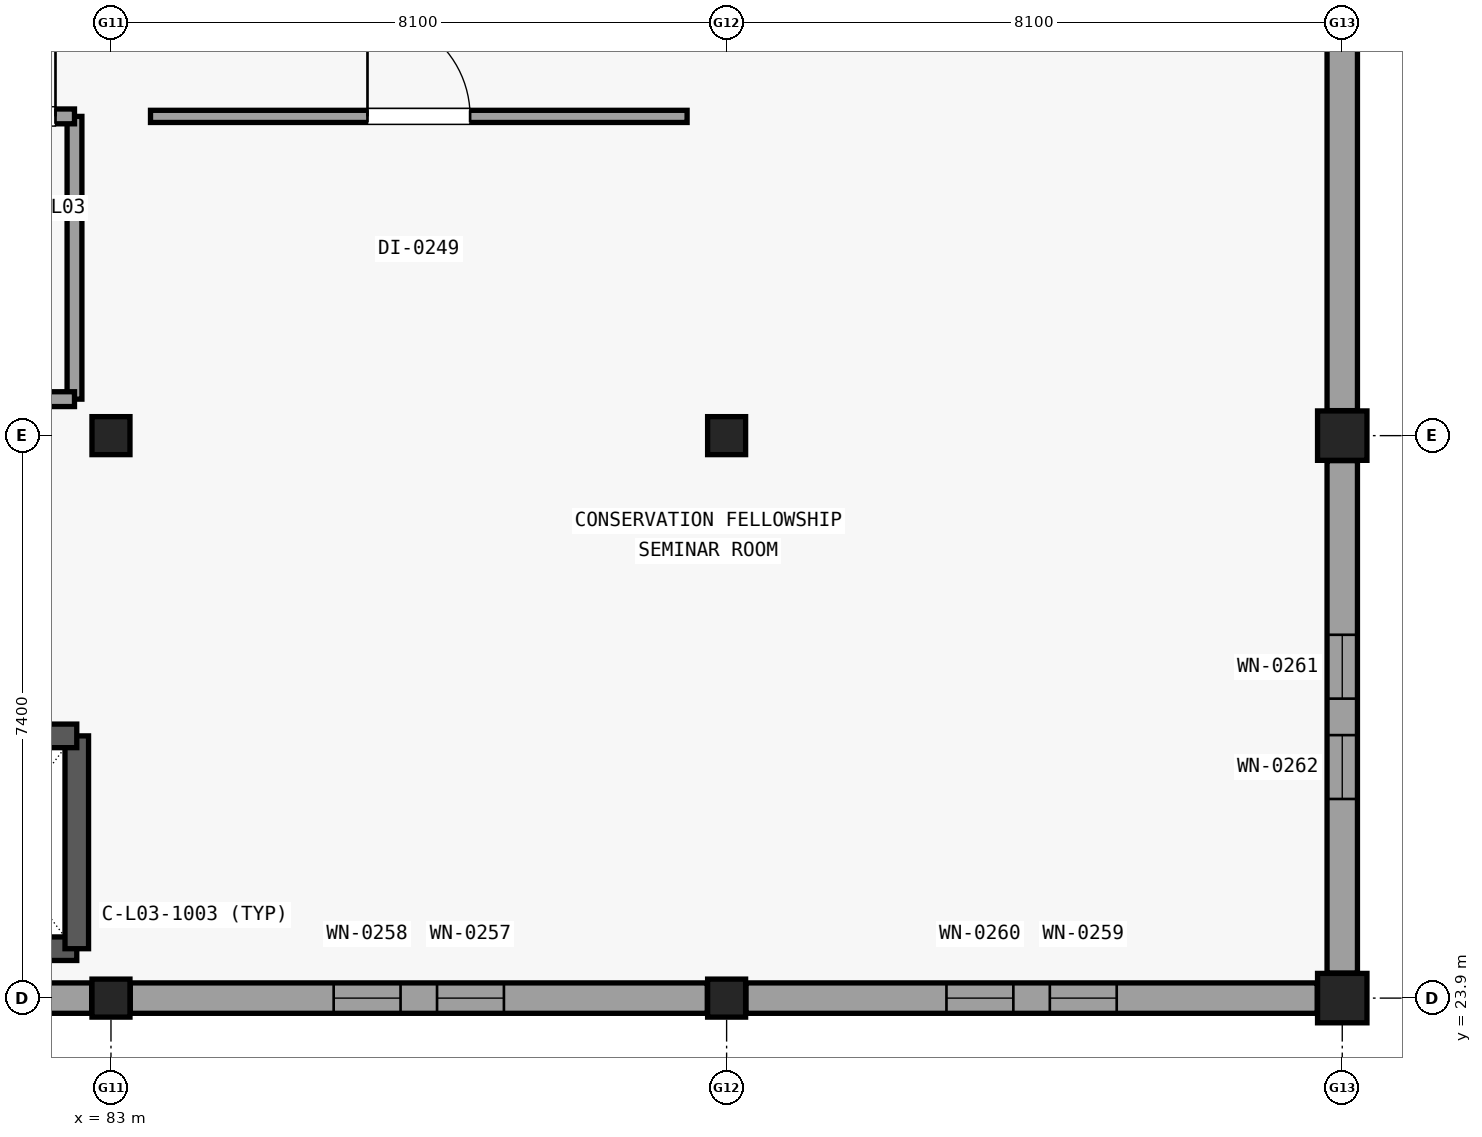
"""IFC4 building model, lengths in metres.
Left out: names, types, materials, properties, quantities, classifications, styles, units other than length and angle.
Written with IfcOpenShell. Run it as: python <this file> out.ifc"""

import sys

from ifc_helpers import new_model, si_unit, direction, frame, frame_2d, origin, origin_2d, place, context, subcontext, project, spatial, rectangle, extrude, element, fill, save


model = new_model("IFC4")
c1 = context("Model", 3, precision=1e-05, world=origin(), true_north=direction((0.0, 1.0)))
c2 = subcontext(c1, "Body", "Model", "MODEL_VIEW")
j1 = project(units=[si_unit("LENGTHUNIT", "METRE"), si_unit("PLANEANGLEUNIT", "RADIAN")], contexts=[c1])
p1 = place(None, origin())
s1 = spatial("IfcSite", under=j1, at=p1, CompositionType="ELEMENT")
p2 = place(p1, origin())
s2 = spatial("IfcBuilding", under=s1, at=p2, CompositionType="ELEMENT")
p3 = place(p2, frame((0.0, 0.0, 13.8)))
s3 = spatial("IfcBuildingStorey", under=s2, at=p3, CompositionType="ELEMENT", Elevation=13.8)
for number, where, z_axis, x_axis in (
    (1, (83.0, 23.9, 0.0), (0.0, 0.0, 1.0), (1.0, 0.0, 0.0)),
    (2, (83.0, 31.3, 0.0), (0.0, 0.0, 1.0), (1.0, 0.0, 0.0)),
    (3, (91.1, 23.9, 0.0), (0.0, 0.0, 1.0), (1.0, 0.0, 0.0)),
    (4, (91.1, 31.3, 0.0), (0.0, 0.0, 1.0), (1.0, 0.0, 0.0)),
):
    element("IfcColumn", number, at=place(p3, frame(where, z_axis=z_axis, x_axis=x_axis)), inside=s3, PredefinedType="COLUMN", context=c2, shape_type="SweptSolid", body=[
        extrude(rectangle(XDim=0.5, YDim=0.5, at=origin_2d()), origin(), (0.0, 0.0, 1.0), 3.38),
    ])
for number, where, z_axis, x_axis in (
    (5, (99.2, 23.9, 0.0), (0.0, 0.0, 1.0), (1.0, 0.0, 0.0)),
    (6, (99.2, 31.3, 0.0), (0.0, 0.0, 1.0), (1.0, 0.0, 0.0)),
):
    element("IfcColumn", number, at=place(p3, frame(where, z_axis=z_axis, x_axis=x_axis)), inside=s3, PredefinedType="COLUMN", context=c2, shape_type="SweptSolid", body=[
        extrude(rectangle(XDim=0.65, YDim=0.65, at=origin_2d()), origin(), (0.0, 0.0, 1.0), 3.38),
    ])
p4 = place(p3, frame((82.746, 23.9, 0.0), z_axis=(0.0, 0.0, 1.0), x_axis=(-1.0, 0.0, 0.0)))
e7 = element("IfcWall", 7, at=p4, inside=s3, PredefinedType="SOLIDWALL", context=c2, shape_type="SweptSolid", body=[
    extrude(rectangle(XDim=7.517, YDim=0.4, at=frame_2d((3.759, 0.0))), origin(), (0.0, 0.0, 1.0), 2.832),
])
p5 = place(p4, frame((2.638, 0.0, 0.6)))
e8 = element("IfcOpeningElement", 8, at=p5, cuts=e7, PredefinedType="OPENING", context=c2, shape_type="SweptSolid", body=[
    extrude(rectangle(XDim=0.88, YDim=1.9, at=frame_2d((0.44, 0.95))), frame((0.0, 0.21, 0.0), z_axis=(0.0, -1.0, 0.0), x_axis=(1.0, 0.0, 0.0)), (0.0, 0.0, 1.0), 0.42),
])
p6 = place(p4, frame((3.999, 0.0, 0.6)))
e9 = element("IfcOpeningElement", 9, at=p6, cuts=e7, PredefinedType="OPENING", context=c2, shape_type="SweptSolid", body=[
    extrude(rectangle(XDim=0.88, YDim=1.9, at=frame_2d((0.44, 0.95))), frame((0.0, 0.21, 0.0), z_axis=(0.0, -1.0, 0.0), x_axis=(1.0, 0.0, 0.0)), (0.0, 0.0, 1.0), 0.42),
])
p7 = place(p3, frame((90.846, 23.9, 0.0), z_axis=(0.0, 0.0, 1.0), x_axis=(-1.0, 0.0, 0.0)))
e10 = element("IfcWall", 10, at=p7, inside=s3, PredefinedType="SOLIDWALL", context=c2, shape_type="SweptSolid", body=[
    extrude(rectangle(XDim=7.592, YDim=0.4, at=frame_2d((3.796, 0.0))), origin(), (0.0, 0.0, 1.0), 2.908),
])
p8 = place(p7, frame((2.676, 0.0, 0.6)))
e11 = element("IfcOpeningElement", 11, at=p8, cuts=e10, PredefinedType="OPENING", context=c2, shape_type="SweptSolid", body=[
    extrude(rectangle(XDim=0.88, YDim=1.9, at=frame_2d((0.44, 0.95))), frame((0.0, 0.21, 0.0), z_axis=(0.0, -1.0, 0.0), x_axis=(1.0, 0.0, 0.0)), (0.0, 0.0, 1.0), 0.42),
])
p9 = place(p7, frame((4.036, 0.0, 0.6)))
e12 = element("IfcOpeningElement", 12, at=p9, cuts=e10, PredefinedType="OPENING", context=c2, shape_type="SweptSolid", body=[
    extrude(rectangle(XDim=0.88, YDim=1.9, at=frame_2d((0.44, 0.95))), frame((0.0, 0.21, 0.0), z_axis=(0.0, -1.0, 0.0), x_axis=(1.0, 0.0, 0.0)), (0.0, 0.0, 1.0), 0.42),
])
p10 = place(p3, frame((98.871, 23.9, 0.0), z_axis=(0.0, 0.0, 1.0), x_axis=(-1.0, 0.0, 0.0)))
e13 = element("IfcWall", 13, at=p10, inside=s3, PredefinedType="SOLIDWALL", context=c2, shape_type="SweptSolid", body=[
    extrude(rectangle(XDim=7.517, YDim=0.4, at=frame_2d((3.759, 0.0))), origin(), (0.0, 0.0, 1.0), 2.832),
])
p11 = place(p10, frame((2.638, 0.0, 0.6)))
e14 = element("IfcOpeningElement", 14, at=p11, cuts=e13, PredefinedType="OPENING", context=c2, shape_type="SweptSolid", body=[
    extrude(rectangle(XDim=0.88, YDim=1.9, at=frame_2d((0.44, 0.95))), frame((0.0, 0.21, 0.0), z_axis=(0.0, -1.0, 0.0), x_axis=(1.0, 0.0, 0.0)), (0.0, 0.0, 1.0), 0.42),
])
p12 = place(p10, frame((3.999, 0.0, 0.6)))
e15 = element("IfcOpeningElement", 15, at=p12, cuts=e13, PredefinedType="OPENING", context=c2, shape_type="SweptSolid", body=[
    extrude(rectangle(XDim=0.88, YDim=1.9, at=frame_2d((0.44, 0.95))), frame((0.0, 0.21, 0.0), z_axis=(0.0, -1.0, 0.0), x_axis=(1.0, 0.0, 0.0)), (0.0, 0.0, 1.0), 0.42),
])
p13 = place(p3, frame((99.2, 30.971, 0.0), z_axis=(0.0, 0.0, 1.0), x_axis=(0.0, -1.0, 0.0)))
e16 = element("IfcWall", 16, at=p13, inside=s3, PredefinedType="SOLIDWALL", context=c2, shape_type="SweptSolid", body=[
    extrude(rectangle(XDim=6.742, YDim=0.4, at=frame_2d((3.371, 0.0))), origin(), (0.0, 0.0, 1.0), 2.832),
])
p14 = place(p13, frame((2.291, 0.0, 0.6)))
e17 = element("IfcOpeningElement", 17, at=p14, cuts=e16, PredefinedType="OPENING", context=c2, shape_type="SweptSolid", body=[
    extrude(rectangle(XDim=0.84, YDim=1.96, at=frame_2d((0.42, 0.98))), frame((0.0, 0.21, 0.0), z_axis=(0.0, -1.0, 0.0), x_axis=(1.0, 0.0, 0.0)), (0.0, 0.0, 1.0), 0.42),
])
p15 = place(p13, frame((3.611, 0.0, 0.6)))
e18 = element("IfcOpeningElement", 18, at=p15, cuts=e16, PredefinedType="OPENING", context=c2, shape_type="SweptSolid", body=[
    extrude(rectangle(XDim=0.84, YDim=1.96, at=frame_2d((0.42, 0.98))), frame((0.0, 0.21, 0.0), z_axis=(0.0, -1.0, 0.0), x_axis=(1.0, 0.0, 0.0)), (0.0, 0.0, 1.0), 0.42),
])
p16 = place(p3, frame((99.2, 38.371, 0.0), z_axis=(0.0, 0.0, 1.0), x_axis=(0.0, -1.0, 0.0)))
e19 = element("IfcWall", 19, at=p16, inside=s3, PredefinedType="SOLIDWALL", context=c2, shape_type="SweptSolid", body=[
    extrude(rectangle(XDim=6.742, YDim=0.4, at=frame_2d((3.371, 0.0))), origin(), (0.0, 0.0, 1.0), 2.603),
])
p17 = place(p3, frame((80.35, 24.55, 0.0), z_axis=(0.0, 0.0, 1.0), x_axis=(1.0, 0.0, 0.0)))
e20 = element("IfcWall", 20, at=p17, inside=s3, PredefinedType="SHEAR", context=c2, shape_type="SweptSolid", body=[
    extrude(rectangle(XDim=2.2, YDim=0.31, at=frame_2d((1.1, 0.0))), origin(), (0.0, 0.0, 1.0), 3.375),
])
p18 = place(p3, frame((82.55, 24.55, 0.0), z_axis=(0.0, 0.0, 1.0), x_axis=(0.0, 1.0, 0.0)))
e21 = element("IfcWall", 21, at=p18, inside=s3, PredefinedType="SHEAR", context=c2, shape_type="SweptSolid", body=[
    extrude(rectangle(XDim=2.8, YDim=0.31, at=frame_2d((1.4, 0.0))), origin(), (0.0, 0.0, 1.0), 3.375),
])
p19 = place(p3, frame((80.35, 27.35, 0.0), z_axis=(0.0, 0.0, 1.0), x_axis=(1.0, 0.0, 0.0)))
e22 = element("IfcWall", 22, at=p19, inside=s3, PredefinedType="SHEAR", context=c2, shape_type="SweptSolid", body=[
    extrude(rectangle(XDim=2.2, YDim=0.31, at=frame_2d((1.1, 0.0))), origin(), (0.0, 0.0, 1.0), 3.375),
])
p20 = place(p19, frame((0.5, 0.0, 0.0)))
e23 = element("IfcOpeningElement", 23, at=p20, cuts=e22, PredefinedType="OPENING", context=c2, shape_type="SweptSolid", body=[
    extrude(rectangle(XDim=1.2, YDim=2.15, at=frame_2d((0.6, 1.075))), frame((0.0, 0.165, 0.0), z_axis=(0.0, -1.0, 0.0), x_axis=(1.0, 0.0, 0.0)), (0.0, 0.0, 1.0), 0.33),
])
p21 = place(p3, frame((82.52, 31.78, 0.0), z_axis=(0.0, 0.0, 1.0), x_axis=(0.0, 1.0, 0.0)))
e24 = element("IfcWall", 24, at=p21, inside=s3, PredefinedType="PARTITIONING", context=c2, shape_type="SweptSolid", body=[
    extrude(rectangle(XDim=3.72, YDim=0.195, at=frame_2d((1.86, 0.0))), origin(), (0.0, 0.0, 1.0), 2.913),
])
p22 = place(p3, frame((79.55, 31.78, 0.0), z_axis=(0.0, 0.0, 1.0), x_axis=(1.0, 0.0, 0.0)))
e25 = element("IfcWall", 25, at=p22, inside=s3, PredefinedType="PARTITIONING", context=c2, shape_type="SweptSolid", body=[
    extrude(rectangle(XDim=2.97, YDim=0.195, at=frame_2d((1.485, 0.0))), origin(), (0.0, 0.0, 1.0), 2.913),
])
p23 = place(p3, frame((79.55, 35.5, 0.0), z_axis=(0.0, 0.0, 1.0), x_axis=(1.0, 0.0, 0.0)))
e26 = element("IfcWall", 26, at=p23, inside=s3, PredefinedType="PARTITIONING", context=c2, shape_type="SweptSolid", body=[
    extrude(rectangle(XDim=2.97, YDim=0.195, at=frame_2d((1.485, 0.0))), origin(), (0.0, 0.0, 1.0), 3.365),
])
p24 = place(p23, frame((0.25, 0.0, 0.0)))
e27 = element("IfcOpeningElement", 27, at=p24, cuts=e26, PredefinedType="OPENING", context=c2, shape_type="SweptSolid", body=[
    extrude(rectangle(XDim=0.95, YDim=2.1, at=frame_2d((0.475, 1.05))), frame((0.0, 0.107, 0.0), z_axis=(0.0, -1.0, 0.0), x_axis=(1.0, 0.0, 0.0)), (0.0, 0.0, 1.0), 0.215),
])
p25 = place(p23, frame((1.82, 0.0, 0.0)))
e28 = element("IfcOpeningElement", 28, at=p25, cuts=e26, PredefinedType="OPENING", context=c2, shape_type="SweptSolid", body=[
    extrude(rectangle(XDim=0.9, YDim=2.1, at=frame_2d((0.45, 1.05))), frame((0.0, 0.107, 0.0), z_axis=(0.0, -1.0, 0.0), x_axis=(1.0, 0.0, 0.0)), (0.0, 0.0, 1.0), 0.215),
])
p26 = place(p3, frame((83.52, 35.5, 0.0), z_axis=(0.0, 0.0, 1.0), x_axis=(1.0, 0.0, 0.0)))
e29 = element("IfcWall", 29, at=p26, inside=s3, PredefinedType="PARTITIONING", context=c2, shape_type="SweptSolid", body=[
    extrude(rectangle(XDim=7.06, YDim=0.16, at=frame_2d((3.53, 0.0))), origin(), (0.0, 0.0, 1.0), 3.365),
])
p27 = place(p26, frame((2.855, 0.0, 0.0)))
e30 = element("IfcOpeningElement", 30, at=p27, cuts=e29, PredefinedType="OPENING", context=c2, shape_type="SweptSolid", body=[
    extrude(rectangle(XDim=1.35, YDim=2.2, at=frame_2d((0.675, 1.1))), frame((0.0, 0.09, 0.0), z_axis=(0.0, -1.0, 0.0), x_axis=(1.0, 0.0, 0.0)), (0.0, 0.0, 1.0), 0.18),
])
p28 = place(p8, origin())
e31 = element("IfcWindow", 31, at=p28, inside=s3, PartitioningType="SINGLE_PANEL", PredefinedType="WINDOW", context=c2, shape_type="SweptSolid", body=[
    extrude(rectangle(XDim=0.88, YDim=1.9, at=frame_2d((0.44, 0.95))), frame((0.0, 0.03, 0.0), z_axis=(0.0, -1.0, 0.0), x_axis=(1.0, 0.0, 0.0)), (0.0, 0.0, 1.0), 0.06),
])
fill(e11, e31)
p29 = place(p9, origin())
e32 = element("IfcWindow", 32, at=p29, inside=s3, PartitioningType="SINGLE_PANEL", PredefinedType="WINDOW", context=c2, shape_type="SweptSolid", body=[
    extrude(rectangle(XDim=0.88, YDim=1.9, at=frame_2d((0.44, 0.95))), frame((0.0, 0.03, 0.0), z_axis=(0.0, -1.0, 0.0), x_axis=(1.0, 0.0, 0.0)), (0.0, 0.0, 1.0), 0.06),
])
fill(e12, e32)
p30 = place(p11, origin())
e33 = element("IfcWindow", 33, at=p30, inside=s3, PartitioningType="SINGLE_PANEL", PredefinedType="WINDOW", context=c2, shape_type="SweptSolid", body=[
    extrude(rectangle(XDim=0.88, YDim=1.9, at=frame_2d((0.44, 0.95))), frame((0.0, 0.03, 0.0), z_axis=(0.0, -1.0, 0.0), x_axis=(1.0, 0.0, 0.0)), (0.0, 0.0, 1.0), 0.06),
])
fill(e14, e33)
p31 = place(p12, origin())
e34 = element("IfcWindow", 34, at=p31, inside=s3, PartitioningType="SINGLE_PANEL", PredefinedType="WINDOW", context=c2, shape_type="SweptSolid", body=[
    extrude(rectangle(XDim=0.88, YDim=1.9, at=frame_2d((0.44, 0.95))), frame((0.0, 0.03, 0.0), z_axis=(0.0, -1.0, 0.0), x_axis=(1.0, 0.0, 0.0)), (0.0, 0.0, 1.0), 0.06),
])
fill(e15, e34)
p32 = place(p14, origin())
e35 = element("IfcWindow", 35, at=p32, inside=s3, PartitioningType="SINGLE_PANEL", PredefinedType="WINDOW", context=c2, shape_type="SweptSolid", body=[
    extrude(rectangle(XDim=0.84, YDim=1.96, at=frame_2d((0.42, 0.98))), frame((0.0, 0.03, 0.0), z_axis=(0.0, -1.0, 0.0), x_axis=(1.0, 0.0, 0.0)), (0.0, 0.0, 1.0), 0.06),
])
fill(e17, e35)
p33 = place(p15, origin())
e36 = element("IfcWindow", 36, at=p33, inside=s3, PartitioningType="SINGLE_PANEL", PredefinedType="WINDOW", context=c2, shape_type="SweptSolid", body=[
    extrude(rectangle(XDim=0.84, YDim=1.96, at=frame_2d((0.42, 0.98))), frame((0.0, 0.03, 0.0), z_axis=(0.0, -1.0, 0.0), x_axis=(1.0, 0.0, 0.0)), (0.0, 0.0, 1.0), 0.06),
])
fill(e18, e36)
p34 = place(p25, origin())
e37 = element("IfcDoor", 37, at=p34, inside=s3, OperationType="SINGLE_SWING_RIGHT", PredefinedType="DOOR", context=c2, shape_type="SweptSolid", body=[
    extrude(rectangle(XDim=0.9, YDim=2.1, at=frame_2d((0.45, 1.05))), frame((0.0, 0.025, 0.0), z_axis=(0.0, -1.0, 0.0), x_axis=(1.0, 0.0, 0.0)), (0.0, 0.0, 1.0), 0.05),
])
fill(e28, e37)
p35 = place(p27, origin())
e38 = element("IfcDoor", 38, at=p35, inside=s3, OperationType="SINGLE_SWING_LEFT", PredefinedType="DOOR", context=c2, shape_type="SweptSolid", body=[
    extrude(rectangle(XDim=1.35, YDim=2.2, at=frame_2d((0.675, 1.1))), frame((0.0, 0.025, 0.0), z_axis=(0.0, -1.0, 0.0), x_axis=(1.0, 0.0, 0.0)), (0.0, 0.0, 1.0), 0.05),
])
fill(e30, e38)
save(model, sys.argv[1])
